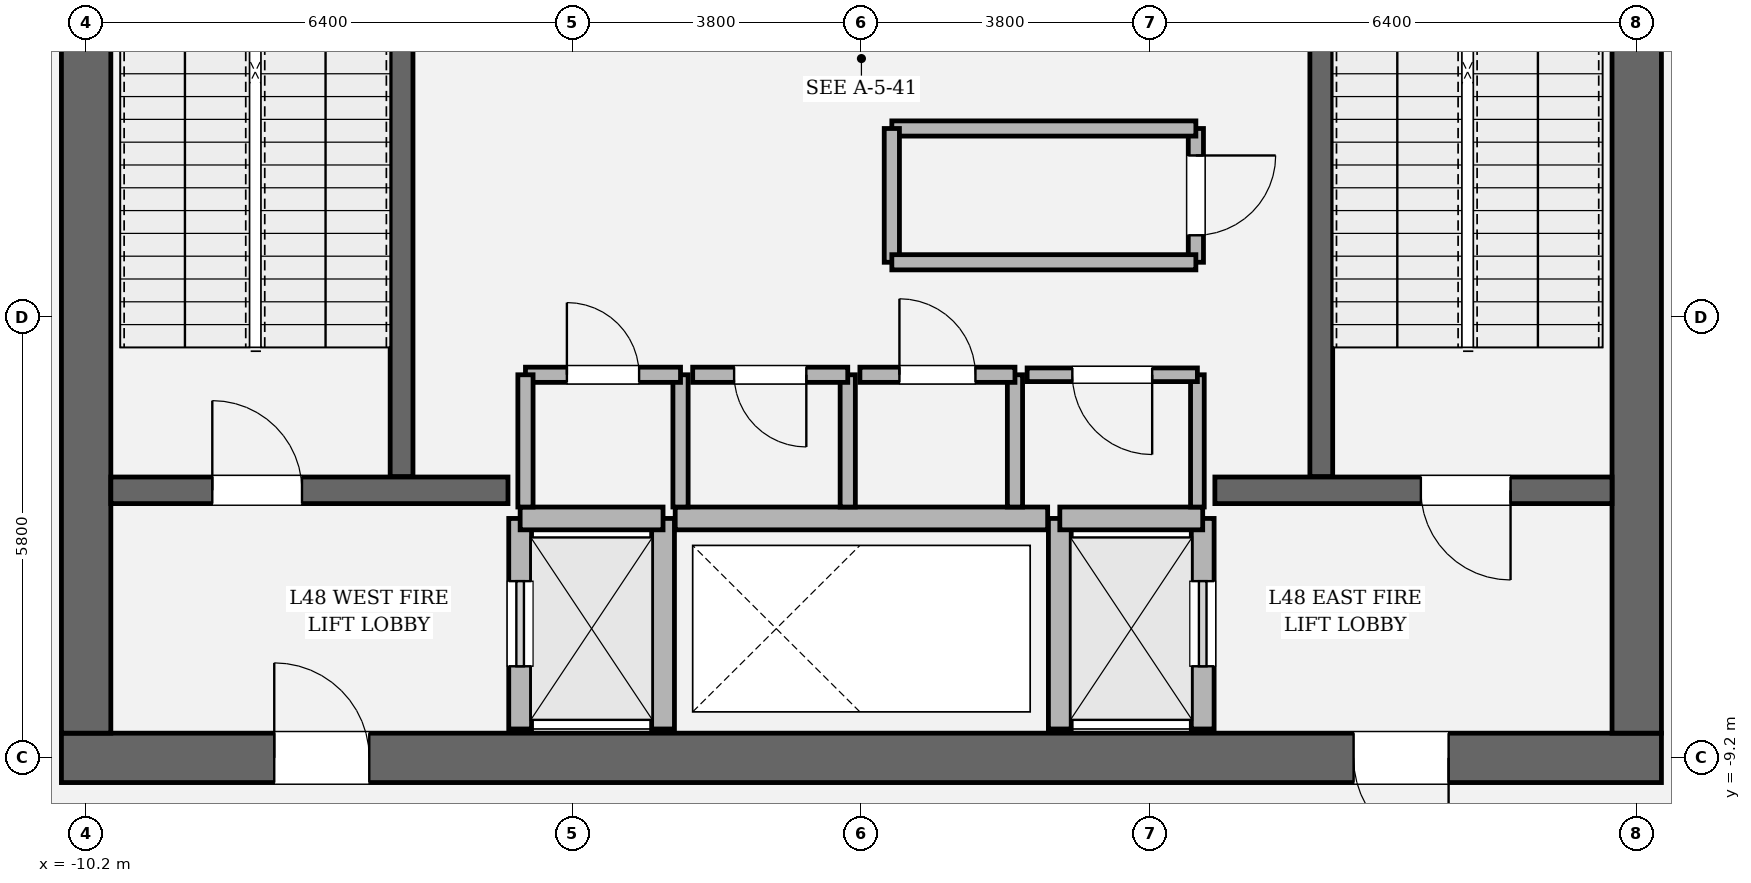
"""IFC4 building model, lengths in metres.
Left out: names, types, materials, properties, quantities, classifications, styles, units other than length and angle.
Written with IfcOpenShell. Run it as: python <this file> out.ifc"""

import sys

from ifc_helpers import new_model, si_unit, direction, frame, frame_2d, origin, place, context, subcontext, project, spatial, rectangle, extrude, element, fill, save


model = new_model("IFC4")
c1 = context("Model", 3, precision=1e-05, world=origin(), true_north=direction((0.0, 1.0)))
c2 = subcontext(c1, "Body", "Model", "MODEL_VIEW")
j1 = project(units=[si_unit("LENGTHUNIT", "METRE"), si_unit("PLANEANGLEUNIT", "RADIAN")], contexts=[c1])
p1 = place(None, origin())
s1 = spatial("IfcSite", under=j1, at=p1, CompositionType="ELEMENT")
p2 = place(p1, origin())
s2 = spatial("IfcBuilding", under=s1, at=p2, CompositionType="ELEMENT")
p3 = place(p2, frame((0.0, 0.0, 204.6)))
s3 = spatial("IfcBuildingStorey", under=s2, at=p3, CompositionType="ELEMENT", Elevation=204.6)
p4 = place(p3, frame((10.525, -9.2, 0.0), z_axis=(0.0, 0.0, 1.0), x_axis=(-1.0, 0.0, 0.0)))
e1 = element("IfcWall", 1, at=p4, inside=s3, PredefinedType="SHEAR", context=c2, shape_type="SweptSolid", body=[
    extrude(rectangle(XDim=21.05, YDim=0.65, at=frame_2d((10.525, 0.0))), origin(), (0.0, 0.0, 1.0), 4.05),
])
p5 = place(p4, frame((2.8, 0.0, 0.0)))
e2 = element("IfcOpeningElement", 2, at=p5, cuts=e1, PredefinedType="OPENING", context=c2, shape_type="SweptSolid", body=[
    extrude(rectangle(XDim=1.25, YDim=2.25, at=frame_2d((0.625, 1.125))), frame((0.0, 0.335, 0.0), z_axis=(0.0, -1.0, 0.0), x_axis=(1.0, 0.0, 0.0)), (0.0, 0.0, 1.0), 0.67),
])
p6 = place(p4, frame((17.0, 0.0, 0.0)))
e3 = element("IfcOpeningElement", 3, at=p6, cuts=e1, PredefinedType="OPENING", context=c2, shape_type="SweptSolid", body=[
    extrude(rectangle(XDim=1.25, YDim=2.25, at=frame_2d((0.625, 1.125))), frame((0.0, 0.335, 0.0), z_axis=(0.0, -1.0, 0.0), x_axis=(1.0, 0.0, 0.0)), (0.0, 0.0, 1.0), 0.67),
])
p7 = place(p3, frame((-10.2, -8.875, 0.0), z_axis=(0.0, 0.0, 1.0), x_axis=(0.0, 1.0, 0.0)))
e4 = element("IfcWall", 4, at=p7, inside=s3, PredefinedType="SHEAR", context=c2, shape_type="SweptSolid", body=[
    extrude(rectangle(XDim=17.75, YDim=0.65, at=frame_2d((8.875, 0.0))), origin(), (0.0, 0.0, 1.0), 4.05),
])
p8 = place(p7, frame((12.665, 0.0, 0.0)))
e5 = element("IfcOpeningElement", 5, at=p8, cuts=e4, PredefinedType="OPENING", context=c2, shape_type="SweptSolid", body=[
    extrude(rectangle(XDim=1.18, YDim=2.2, at=frame_2d((0.59, 1.1))), frame((0.0, 0.335, 0.0), z_axis=(0.0, -1.0, 0.0), x_axis=(1.0, 0.0, 0.0)), (0.0, 0.0, 1.0), 0.67),
])
p9 = place(p3, frame((10.2, 8.875, 0.0), z_axis=(0.0, 0.0, 1.0), x_axis=(0.0, -1.0, 0.0)))
e6 = element("IfcWall", 6, at=p9, inside=s3, PredefinedType="SHEAR", context=c2, shape_type="SweptSolid", body=[
    extrude(rectangle(XDim=17.75, YDim=0.65, at=frame_2d((8.875, 0.0))), origin(), (0.0, 0.0, 1.0), 4.05),
])
p10 = place(p9, frame((3.905, 0.0, 0.0)))
e7 = element("IfcOpeningElement", 7, at=p10, cuts=e6, PredefinedType="OPENING", context=c2, shape_type="SweptSolid", body=[
    extrude(rectangle(XDim=1.18, YDim=2.2, at=frame_2d((0.59, 1.1))), frame((0.0, 0.335, 0.0), z_axis=(0.0, -1.0, 0.0), x_axis=(1.0, 0.0, 0.0)), (0.0, 0.0, 1.0), 0.67),
])
for number, where, z_axis, x_axis in (
    (8, (-6.05, -5.5, 0.0), (0.0, 0.0, 1.0), (0.0, 1.0, 0.0)),
    (9, (6.05, 3.45, 0.0), (0.0, 0.0, 1.0), (0.0, -1.0, 0.0)),
):
    element("IfcWall", number, at=place(p3, frame(where, z_axis=z_axis, x_axis=x_axis)), inside=s3, PredefinedType="SOLIDWALL", context=c2, shape_type="SweptSolid", body=[
        extrude(rectangle(XDim=8.95, YDim=0.3, at=frame_2d((4.475, 0.0))), origin(), (0.0, 0.0, 1.0), 4.05),
    ])
p11 = place(p3, frame((-9.875, -5.68, 0.0), z_axis=(0.0, 0.0, 1.0), x_axis=(1.0, 0.0, 0.0)))
e10 = element("IfcWall", 10, at=p11, inside=s3, PredefinedType="SOLIDWALL", context=c2, shape_type="SweptSolid", body=[
    extrude(rectangle(XDim=5.225, YDim=0.35, at=frame_2d((2.613, 0.0))), origin(), (0.0, 0.0, 1.0), 4.05),
])
p12 = place(p11, frame((1.335, 0.0, 0.0)))
e11 = element("IfcOpeningElement", 11, at=p12, cuts=e10, PredefinedType="OPENING", context=c2, shape_type="SweptSolid", body=[
    extrude(rectangle(XDim=1.18, YDim=2.2, at=frame_2d((0.59, 1.1))), frame((0.0, 0.185, 0.0), z_axis=(0.0, -1.0, 0.0), x_axis=(1.0, 0.0, 0.0)), (0.0, 0.0, 1.0), 0.37),
])
p13 = place(p3, frame((4.65, -5.68, 0.0), z_axis=(0.0, 0.0, 1.0), x_axis=(1.0, 0.0, 0.0)))
e12 = element("IfcWall", 12, at=p13, inside=s3, PredefinedType="SOLIDWALL", context=c2, shape_type="SweptSolid", body=[
    extrude(rectangle(XDim=5.225, YDim=0.35, at=frame_2d((2.613, 0.0))), origin(), (0.0, 0.0, 1.0), 4.05),
])
p14 = place(p13, frame((2.71, 0.0, 0.0)))
e13 = element("IfcOpeningElement", 13, at=p14, cuts=e12, PredefinedType="OPENING", context=c2, shape_type="SweptSolid", body=[
    extrude(rectangle(XDim=1.18, YDim=2.2, at=frame_2d((0.59, 1.1))), frame((0.0, 0.185, 0.0), z_axis=(0.0, -1.0, 0.0), x_axis=(1.0, 0.0, 0.0)), (0.0, 0.0, 1.0), 0.37),
])
p15 = place(p3, frame((-4.49, -8.82, 0.0), z_axis=(0.0, 0.0, 1.0), x_axis=(0.0, 1.0, 0.0)))
e14 = element("IfcWall", 14, at=p15, inside=s3, PredefinedType="SOLIDWALL", context=c2, shape_type="SweptSolid", body=[
    extrude(rectangle(XDim=2.77, YDim=0.3, at=frame_2d((1.385, 0.0))), origin(), (0.0, 0.0, 1.0), 3.83),
])
p16 = place(p15, frame((0.825, 0.0, 0.0)))
e15 = element("IfcOpeningElement", 15, at=p16, cuts=e14, PredefinedType="OPENING", context=c2, shape_type="SweptSolid", body=[
    extrude(rectangle(XDim=1.12, YDim=2.25, at=frame_2d((0.56, 1.125))), frame((0.0, 0.16, 0.0), z_axis=(0.0, -1.0, 0.0), x_axis=(1.0, 0.0, 0.0)), (0.0, 0.0, 1.0), 0.32),
])
p17 = place(p3, frame((-2.61, -8.82, 0.0), z_axis=(0.0, 0.0, 1.0), x_axis=(0.0, 1.0, 0.0)))
e16 = element("IfcWall", 16, at=p17, inside=s3, PredefinedType="SOLIDWALL", context=c2, shape_type="SweptSolid", body=[
    extrude(rectangle(XDim=2.77, YDim=0.3, at=frame_2d((1.385, 0.0))), origin(), (0.0, 0.0, 1.0), 3.83),
])
p18 = place(p3, frame((-4.49, -6.05, 0.0), z_axis=(0.0, 0.0, 1.0), x_axis=(1.0, 0.0, 0.0)))
e17 = element("IfcWall", 17, at=p18, inside=s3, PredefinedType="SOLIDWALL", context=c2, shape_type="SweptSolid", body=[
    extrude(rectangle(XDim=1.88, YDim=0.3, at=frame_2d((0.94, 0.0))), origin(), (0.0, 0.0, 1.0), 3.83),
])
p19 = place(p3, frame((4.49, -8.82, 0.0), z_axis=(0.0, 0.0, 1.0), x_axis=(0.0, 1.0, 0.0)))
e18 = element("IfcWall", 18, at=p19, inside=s3, PredefinedType="SOLIDWALL", context=c2, shape_type="SweptSolid", body=[
    extrude(rectangle(XDim=2.77, YDim=0.3, at=frame_2d((1.385, 0.0))), origin(), (0.0, 0.0, 1.0), 3.83),
])
p20 = place(p19, frame((0.825, 0.0, 0.0)))
e19 = element("IfcOpeningElement", 19, at=p20, cuts=e18, PredefinedType="OPENING", context=c2, shape_type="SweptSolid", body=[
    extrude(rectangle(XDim=1.12, YDim=2.25, at=frame_2d((0.56, 1.125))), frame((0.0, 0.16, 0.0), z_axis=(0.0, -1.0, 0.0), x_axis=(1.0, 0.0, 0.0)), (0.0, 0.0, 1.0), 0.32),
])
p21 = place(p3, frame((2.61, -8.82, 0.0), z_axis=(0.0, 0.0, 1.0), x_axis=(0.0, 1.0, 0.0)))
e20 = element("IfcWall", 20, at=p21, inside=s3, PredefinedType="SOLIDWALL", context=c2, shape_type="SweptSolid", body=[
    extrude(rectangle(XDim=2.77, YDim=0.3, at=frame_2d((1.385, 0.0))), origin(), (0.0, 0.0, 1.0), 3.83),
])
p22 = place(p3, frame((2.61, -6.05, 0.0), z_axis=(0.0, 0.0, 1.0), x_axis=(1.0, 0.0, 0.0)))
e21 = element("IfcWall", 21, at=p22, inside=s3, PredefinedType="SOLIDWALL", context=c2, shape_type="SweptSolid", body=[
    extrude(rectangle(XDim=1.88, YDim=0.3, at=frame_2d((0.94, 0.0))), origin(), (0.0, 0.0, 1.0), 3.83),
])
p23 = place(p3, frame((-2.45, -6.05, 0.0), z_axis=(0.0, 0.0, 1.0), x_axis=(1.0, 0.0, 0.0)))
e22 = element("IfcWall", 22, at=p23, inside=s3, PredefinedType="SOLIDWALL", context=c2, shape_type="SweptSolid", body=[
    extrude(rectangle(XDim=4.9, YDim=0.3, at=frame_2d((2.45, 0.0))), origin(), (0.0, 0.0, 1.0), 3.83),
])
p24 = place(p3, frame((-2.38, -5.9, 0.0), z_axis=(0.0, 0.0, 1.0), x_axis=(0.0, 1.0, 0.0)))
e23 = element("IfcWall", 23, at=p24, inside=s3, PredefinedType="SOLIDWALL", context=c2, shape_type="SweptSolid", body=[
    extrude(rectangle(XDim=1.74, YDim=0.2, at=frame_2d((0.87, 0.0))), origin(), (0.0, 0.0, 1.0), 3.83),
])
p25 = place(p3, frame((-2.38, -4.16, 0.0), z_axis=(0.0, 0.0, 1.0), x_axis=(-1.0, 0.0, 0.0)))
e24 = element("IfcWall", 24, at=p25, inside=s3, PredefinedType="SOLIDWALL", context=c2, shape_type="SweptSolid", body=[
    extrude(rectangle(XDim=2.04, YDim=0.2, at=frame_2d((1.02, 0.0))), origin(), (0.0, 0.0, 1.0), 3.83),
])
p26 = place(p25, frame((0.545, 0.0, 0.0)))
e25 = element("IfcOpeningElement", 25, at=p26, cuts=e24, PredefinedType="OPENING", context=c2, shape_type="SweptSolid", body=[
    extrude(rectangle(XDim=0.95, YDim=2.15, at=frame_2d((0.475, 1.075))), frame((0.0, 0.11, 0.0), z_axis=(0.0, -1.0, 0.0), x_axis=(1.0, 0.0, 0.0)), (0.0, 0.0, 1.0), 0.22),
])
for number, where, z_axis, x_axis in (
    (26, (-4.42, -4.16, 0.0), (0.0, 0.0, 1.0), (0.0, -1.0, 0.0)),
    (27, (-0.18, -5.9, 0.0), (0.0, 0.0, 1.0), (0.0, 1.0, 0.0)),
):
    element("IfcWall", number, at=place(p3, frame(where, z_axis=z_axis, x_axis=x_axis)), inside=s3, PredefinedType="SOLIDWALL", context=c2, shape_type="SweptSolid", body=[
        extrude(rectangle(XDim=1.74, YDim=0.2, at=frame_2d((0.87, 0.0))), origin(), (0.0, 0.0, 1.0), 3.83),
    ])
p27 = place(p3, frame((-0.18, -4.16, 0.0), z_axis=(0.0, 0.0, 1.0), x_axis=(-1.0, 0.0, 0.0)))
e28 = element("IfcWall", 28, at=p27, inside=s3, PredefinedType="SOLIDWALL", context=c2, shape_type="SweptSolid", body=[
    extrude(rectangle(XDim=2.04, YDim=0.2, at=frame_2d((1.02, 0.0))), origin(), (0.0, 0.0, 1.0), 3.83),
])
p28 = place(p27, frame((0.545, 0.0, 0.0)))
e29 = element("IfcOpeningElement", 29, at=p28, cuts=e28, PredefinedType="OPENING", context=c2, shape_type="SweptSolid", body=[
    extrude(rectangle(XDim=0.95, YDim=2.15, at=frame_2d((0.475, 1.075))), frame((0.0, 0.11, 0.0), z_axis=(0.0, -1.0, 0.0), x_axis=(1.0, 0.0, 0.0)), (0.0, 0.0, 1.0), 0.22),
])
p29 = place(p3, frame((2.02, -5.9, 0.0), z_axis=(0.0, 0.0, 1.0), x_axis=(0.0, 1.0, 0.0)))
e30 = element("IfcWall", 30, at=p29, inside=s3, PredefinedType="SOLIDWALL", context=c2, shape_type="SweptSolid", body=[
    extrude(rectangle(XDim=1.74, YDim=0.2, at=frame_2d((0.87, 0.0))), origin(), (0.0, 0.0, 1.0), 3.83),
])
p30 = place(p3, frame((2.02, -4.16, 0.0), z_axis=(0.0, 0.0, 1.0), x_axis=(-1.0, 0.0, 0.0)))
e31 = element("IfcWall", 31, at=p30, inside=s3, PredefinedType="SOLIDWALL", context=c2, shape_type="SweptSolid", body=[
    extrude(rectangle(XDim=2.04, YDim=0.2, at=frame_2d((1.02, 0.0))), origin(), (0.0, 0.0, 1.0), 3.83),
])
p31 = place(p30, frame((0.52, 0.0, 0.0)))
e32 = element("IfcOpeningElement", 32, at=p31, cuts=e31, PredefinedType="OPENING", context=c2, shape_type="SweptSolid", body=[
    extrude(rectangle(XDim=1.0, YDim=2.15, at=frame_2d((0.5, 1.075))), frame((0.0, 0.11, 0.0), z_axis=(0.0, -1.0, 0.0), x_axis=(1.0, 0.0, 0.0)), (0.0, 0.0, 1.0), 0.22),
])
p32 = place(p3, frame((4.42, -5.9, 0.0), z_axis=(0.0, 0.0, 1.0), x_axis=(0.0, 1.0, 0.0)))
e33 = element("IfcWall", 33, at=p32, inside=s3, PredefinedType="PARTITIONING", context=c2, shape_type="SweptSolid", body=[
    extrude(rectangle(XDim=1.74, YDim=0.18, at=frame_2d((0.87, 0.0))), origin(), (0.0, 0.0, 1.0), 3.83),
])
p33 = place(p3, frame((4.42, -4.16, 0.0), z_axis=(0.0, 0.0, 1.0), x_axis=(-1.0, 0.0, 0.0)))
e34 = element("IfcWall", 34, at=p33, inside=s3, PredefinedType="PARTITIONING", context=c2, shape_type="SweptSolid", body=[
    extrude(rectangle(XDim=2.24, YDim=0.18, at=frame_2d((1.12, 0.0))), origin(), (0.0, 0.0, 1.0), 3.83),
])
p34 = place(p33, frame((0.595, 0.0, 0.0)))
e35 = element("IfcOpeningElement", 35, at=p34, cuts=e34, PredefinedType="OPENING", context=c2, shape_type="SweptSolid", body=[
    extrude(rectangle(XDim=1.05, YDim=2.2, at=frame_2d((0.525, 1.1))), frame((0.0, 0.1, 0.0), z_axis=(0.0, -1.0, 0.0), x_axis=(1.0, 0.0, 0.0)), (0.0, 0.0, 1.0), 0.2),
])
p35 = place(p3, frame((4.4, -2.68, 0.0), z_axis=(0.0, 0.0, 1.0), x_axis=(0.0, 1.0, 0.0)))
e36 = element("IfcWall", 36, at=p35, inside=s3, PredefinedType="SOLIDWALL", context=c2, shape_type="SweptSolid", body=[
    extrude(rectangle(XDim=1.76, YDim=0.2, at=frame_2d((0.88, 0.0))), origin(), (0.0, 0.0, 1.0), 3.83),
])
p36 = place(p35, frame((0.355, 0.0, 0.0)))
e37 = element("IfcOpeningElement", 37, at=p36, cuts=e36, PredefinedType="OPENING", context=c2, shape_type="SweptSolid", body=[
    extrude(rectangle(XDim=1.05, YDim=2.2, at=frame_2d((0.525, 1.1))), frame((0.0, 0.11, 0.0), z_axis=(0.0, -1.0, 0.0), x_axis=(1.0, 0.0, 0.0)), (0.0, 0.0, 1.0), 0.22),
])
p37 = place(p3, frame((4.4, -0.92, 0.0), z_axis=(0.0, 0.0, 1.0), x_axis=(-1.0, 0.0, 0.0)))
e38 = element("IfcWall", 38, at=p37, inside=s3, PredefinedType="SOLIDWALL", context=c2, shape_type="SweptSolid", body=[
    extrude(rectangle(XDim=4.0, YDim=0.2, at=frame_2d((2.0, 0.0))), origin(), (0.0, 0.0, 1.0), 3.83),
])
p38 = place(p3, frame((0.4, -0.92, 0.0), z_axis=(0.0, 0.0, 1.0), x_axis=(0.0, -1.0, 0.0)))
e39 = element("IfcWall", 39, at=p38, inside=s3, PredefinedType="SOLIDWALL", context=c2, shape_type="SweptSolid", body=[
    extrude(rectangle(XDim=1.76, YDim=0.2, at=frame_2d((0.88, 0.0))), origin(), (0.0, 0.0, 1.0), 3.83),
])
p39 = place(p3, frame((0.4, -2.68, 0.0), z_axis=(0.0, 0.0, 1.0), x_axis=(1.0, 0.0, 0.0)))
e40 = element("IfcWall", 40, at=p39, inside=s3, PredefinedType="SOLIDWALL", context=c2, shape_type="SweptSolid", body=[
    extrude(rectangle(XDim=4.0, YDim=0.2, at=frame_2d((2.0, 0.0))), origin(), (0.0, 0.0, 1.0), 3.83),
])
p40 = place(p12, origin())
e41 = element("IfcDoor", 41, at=p40, inside=s3, OperationType="SINGLE_SWING_LEFT", PredefinedType="DOOR", context=c2, shape_type="SweptSolid", body=[
    extrude(rectangle(XDim=1.18, YDim=2.2, at=frame_2d((0.59, 1.1))), frame((0.0, 0.025, 0.0), z_axis=(0.0, -1.0, 0.0), x_axis=(1.0, 0.0, 0.0)), (0.0, 0.0, 1.0), 0.05),
])
fill(e11, e41)
p41 = place(p14, origin())
e42 = element("IfcDoor", 42, at=p41, inside=s3, OperationType="SINGLE_SWING_RIGHT", PredefinedType="DOOR", context=c2, shape_type="SweptSolid", body=[
    extrude(rectangle(XDim=1.18, YDim=2.2, at=frame_2d((0.59, 1.1))), frame((0.0, 0.025, 0.0), z_axis=(0.0, -1.0, 0.0), x_axis=(1.0, 0.0, 0.0)), (0.0, 0.0, 1.0), 0.05),
])
fill(e13, e42)
p42 = place(p5, origin())
e43 = element("IfcDoor", 43, at=p42, inside=s3, OperationType="SINGLE_SWING_LEFT", PredefinedType="DOOR", context=c2, shape_type="SweptSolid", body=[
    extrude(rectangle(XDim=1.25, YDim=2.25, at=frame_2d((0.625, 1.125))), frame((0.0, 0.025, 0.0), z_axis=(0.0, -1.0, 0.0), x_axis=(1.0, 0.0, 0.0)), (0.0, 0.0, 1.0), 0.05),
])
fill(e2, e43)
p43 = place(p6, origin())
e44 = element("IfcDoor", 44, at=p43, inside=s3, OperationType="SINGLE_SWING_RIGHT", PredefinedType="DOOR", context=c2, shape_type="SweptSolid", body=[
    extrude(rectangle(XDim=1.25, YDim=2.25, at=frame_2d((0.625, 1.125))), frame((0.0, 0.025, 0.0), z_axis=(0.0, -1.0, 0.0), x_axis=(1.0, 0.0, 0.0)), (0.0, 0.0, 1.0), 0.05),
])
fill(e3, e44)
p44 = place(p16, origin())
e45 = element("IfcDoor", 45, at=p44, inside=s3, OperationType="SLIDING_TO_LEFT", PredefinedType="DOOR", context=c2, shape_type="SweptSolid", body=[
    extrude(rectangle(XDim=1.12, YDim=2.25, at=frame_2d((0.56, 1.125))), frame((0.0, 0.025, 0.0), z_axis=(0.0, -1.0, 0.0), x_axis=(1.0, 0.0, 0.0)), (0.0, 0.0, 1.0), 0.05),
])
fill(e15, e45)
p45 = place(p20, origin())
e46 = element("IfcDoor", 46, at=p45, inside=s3, OperationType="SLIDING_TO_RIGHT", PredefinedType="DOOR", context=c2, shape_type="SweptSolid", body=[
    extrude(rectangle(XDim=1.12, YDim=2.25, at=frame_2d((0.56, 1.125))), frame((0.0, 0.025, 0.0), z_axis=(0.0, -1.0, 0.0), x_axis=(1.0, 0.0, 0.0)), (0.0, 0.0, 1.0), 0.05),
])
fill(e19, e46)
p46 = place(p26, origin())
e47 = element("IfcDoor", 47, at=p46, inside=s3, OperationType="SINGLE_SWING_RIGHT", PredefinedType="DOOR", context=c2, shape_type="SweptSolid", body=[
    extrude(rectangle(XDim=0.95, YDim=2.15, at=frame_2d((0.475, 1.075))), frame((0.0, 0.025, 0.0), z_axis=(0.0, -1.0, 0.0), x_axis=(1.0, 0.0, 0.0)), (0.0, 0.0, 1.0), 0.05),
])
fill(e25, e47)
p47 = place(p28, origin())
e48 = element("IfcDoor", 48, at=p47, inside=s3, OperationType="SINGLE_SWING_LEFT", PredefinedType="DOOR", context=c2, shape_type="SweptSolid", body=[
    extrude(rectangle(XDim=0.95, YDim=2.15, at=frame_2d((0.475, 1.075))), frame((0.0, 0.025, 0.0), z_axis=(0.0, -1.0, 0.0), x_axis=(1.0, 0.0, 0.0)), (0.0, 0.0, 1.0), 0.05),
])
fill(e29, e48)
p48 = place(p31, origin())
e49 = element("IfcDoor", 49, at=p48, inside=s3, OperationType="SINGLE_SWING_RIGHT", PredefinedType="DOOR", context=c2, shape_type="SweptSolid", body=[
    extrude(rectangle(XDim=1.0, YDim=2.15, at=frame_2d((0.5, 1.075))), frame((0.0, 0.025, 0.0), z_axis=(0.0, -1.0, 0.0), x_axis=(1.0, 0.0, 0.0)), (0.0, 0.0, 1.0), 0.05),
])
fill(e32, e49)
p49 = place(p34, origin())
e50 = element("IfcDoor", 50, at=p49, inside=s3, OperationType="SINGLE_SWING_LEFT", PredefinedType="DOOR", context=c2, shape_type="SweptSolid", body=[
    extrude(rectangle(XDim=1.05, YDim=2.2, at=frame_2d((0.525, 1.1))), frame((0.0, 0.025, 0.0), z_axis=(0.0, -1.0, 0.0), x_axis=(1.0, 0.0, 0.0)), (0.0, 0.0, 1.0), 0.05),
])
fill(e35, e50)
p50 = place(p36, origin())
e51 = element("IfcDoor", 51, at=p50, inside=s3, OperationType="SINGLE_SWING_RIGHT", PredefinedType="DOOR", context=c2, shape_type="SweptSolid", body=[
    extrude(rectangle(XDim=1.05, YDim=2.2, at=frame_2d((0.525, 1.1))), frame((0.0, 0.025, 0.0), z_axis=(0.0, -1.0, 0.0), x_axis=(1.0, 0.0, 0.0)), (0.0, 0.0, 1.0), 0.05),
])
fill(e37, e51)
save(model, sys.argv[1])
